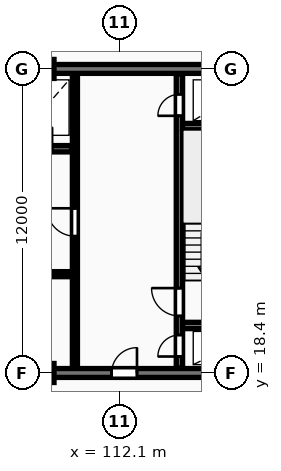
"""IFC4 building model, lengths in metres.
Left out: names, types, materials, properties, quantities, classifications, styles, units other than length and angle.
Written with IfcOpenShell. Run it as: python <this file> out.ifc"""

import sys

from ifc_helpers import new_model, si_unit, direction, frame, frame_2d, origin, origin_2d, place, context, subcontext, project, spatial, rectangle, extrude, element, fill, save


model = new_model("IFC4")
c1 = context("Model", 3, precision=1e-05, world=origin(), true_north=direction((0.0, 1.0)))
c2 = subcontext(c1, "Body", "Model", "MODEL_VIEW")
j1 = project(units=[si_unit("LENGTHUNIT", "METRE"), si_unit("PLANEANGLEUNIT", "RADIAN")], contexts=[c1])
p1 = place(None, origin())
s1 = spatial("IfcSite", under=j1, at=p1, CompositionType="ELEMENT")
p2 = place(p1, origin())
s2 = spatial("IfcBuilding", under=s1, at=p2, CompositionType="ELEMENT")
p3 = place(p2, frame((0.0, 0.0, 119.8)))
s3 = spatial("IfcBuildingStorey", under=s2, at=p3, CompositionType="ELEMENT", Elevation=119.8)
for number, where, z_axis, x_axis in (
    (1, (109.1, 18.4, 0.0), (0.0, 0.0, 1.0), (1.0, 0.0, 0.0)),
    (2, (109.1, 30.4, 0.0), (0.0, 0.0, 1.0), (1.0, 0.0, 0.0)),
):
    element("IfcColumn", number, at=place(p3, frame(where, z_axis=z_axis, x_axis=x_axis)), inside=s3, PredefinedType="COLUMN", context=c2, shape_type="SweptSolid", body=[
        extrude(rectangle(XDim=0.85, YDim=0.75, at=origin_2d()), origin(), (0.0, 0.0, 1.0), 3.25),
    ])
p4 = place(p3, frame((81.925, 30.4, 0.0), z_axis=(0.0, 0.0, 1.0), x_axis=(1.0, 0.0, 0.0)))
e3 = element("IfcWall", 3, at=p4, inside=s3, PredefinedType="SHEAR", context=c2, shape_type="SweptSolid", body=[
    extrude(rectangle(XDim=36.265, YDim=0.35, at=frame_2d((18.132, 0.0))), origin(), (0.0, 0.0, 1.0), 3.25),
])
p5 = place(p3, frame((81.925, 18.4, 0.0), z_axis=(0.0, 0.0, 1.0), x_axis=(1.0, 0.0, 0.0)))
e4 = element("IfcWall", 4, at=p5, inside=s3, PredefinedType="SHEAR", context=c2, shape_type="SweptSolid", body=[
    extrude(rectangle(XDim=36.265, YDim=0.35, at=frame_2d((18.132, 0.0))), origin(), (0.0, 0.0, 1.0), 3.25),
])
p6 = place(p5, frame((5.675, 0.0, 0.0)))
e5 = element("IfcOpeningElement", 5, at=p6, cuts=e4, PredefinedType="OPENING", context=c2, shape_type="SweptSolid", body=[
    extrude(rectangle(XDim=1.0, YDim=2.15, at=frame_2d((0.5, 1.075))), frame((0.0, 0.185, 0.0), z_axis=(0.0, -1.0, 0.0), x_axis=(1.0, 0.0, 0.0)), (0.0, 0.0, 1.0), 0.37),
])
p7 = place(p5, frame((21.925, 0.0, 0.0)))
e6 = element("IfcOpeningElement", 6, at=p7, cuts=e4, PredefinedType="OPENING", context=c2, shape_type="SweptSolid", body=[
    extrude(rectangle(XDim=1.5, YDim=2.2, at=frame_2d((0.75, 1.1))), frame((0.0, 0.185, 0.0), z_axis=(0.0, -1.0, 0.0), x_axis=(1.0, 0.0, 0.0)), (0.0, 0.0, 1.0), 0.37),
])
p8 = place(p5, frame((29.875, 0.0, 0.0)))
e7 = element("IfcOpeningElement", 7, at=p8, cuts=e4, PredefinedType="OPENING", context=c2, shape_type="SweptSolid", body=[
    extrude(rectangle(XDim=1.0, YDim=2.15, at=frame_2d((0.5, 1.075))), frame((0.0, 0.185, 0.0), z_axis=(0.0, -1.0, 0.0), x_axis=(1.0, 0.0, 0.0)), (0.0, 0.0, 1.0), 0.37),
])
p9 = place(p3, frame((99.68, 27.25, 0.0), z_axis=(0.0, 0.0, 1.0), x_axis=(1.0, 0.0, 0.0)))
e8 = element("IfcWall", 8, at=p9, inside=s3, PredefinedType="SHEAR", context=c2, shape_type="SweptSolid", body=[
    extrude(rectangle(XDim=10.54, YDim=0.25, at=frame_2d((5.27, 0.0))), origin(), (0.0, 0.0, 1.0), 3.25),
])
p10 = place(p9, frame((0.76, 0.0, 0.0)))
e9 = element("IfcOpeningElement", 9, at=p10, cuts=e8, PredefinedType="OPENING", context=c2, shape_type="SweptSolid", body=[
    extrude(rectangle(XDim=1.12, YDim=2.12, at=frame_2d((0.56, 1.06))), frame((0.0, 0.135, 0.0), z_axis=(0.0, -1.0, 0.0), x_axis=(1.0, 0.0, 0.0)), (0.0, 0.0, 1.0), 0.27),
])
p11 = place(p9, frame((3.56, 0.0, 0.0)))
e10 = element("IfcOpeningElement", 10, at=p11, cuts=e8, PredefinedType="OPENING", context=c2, shape_type="SweptSolid", body=[
    extrude(rectangle(XDim=1.12, YDim=2.12, at=frame_2d((0.56, 1.06))), frame((0.0, 0.135, 0.0), z_axis=(0.0, -1.0, 0.0), x_axis=(1.0, 0.0, 0.0)), (0.0, 0.0, 1.0), 0.27),
])
p12 = place(p9, frame((6.36, 0.0, 0.0)))
e11 = element("IfcOpeningElement", 11, at=p12, cuts=e8, PredefinedType="OPENING", context=c2, shape_type="SweptSolid", body=[
    extrude(rectangle(XDim=1.12, YDim=2.12, at=frame_2d((0.56, 1.06))), frame((0.0, 0.135, 0.0), z_axis=(0.0, -1.0, 0.0), x_axis=(1.0, 0.0, 0.0)), (0.0, 0.0, 1.0), 0.27),
])
p13 = place(p9, frame((8.92, 0.0, 0.0)))
e12 = element("IfcOpeningElement", 12, at=p13, cuts=e8, PredefinedType="OPENING", context=c2, shape_type="SweptSolid", body=[
    extrude(rectangle(XDim=0.85, YDim=2.05, at=frame_2d((0.425, 1.025))), frame((0.0, 0.135, 0.0), z_axis=(0.0, -1.0, 0.0), x_axis=(1.0, 0.0, 0.0)), (0.0, 0.0, 1.0), 0.27),
])
p14 = place(p3, frame((91.08, 22.3, 0.0), z_axis=(0.0, 0.0, 1.0), x_axis=(1.0, 0.0, 0.0)))
e13 = element("IfcWall", 13, at=p14, inside=s3, PredefinedType="PARTITIONING", context=c2, shape_type="SweptSolid", body=[
    extrude(rectangle(XDim=19.14, YDim=0.2, at=frame_2d((9.57, 0.0))), origin(), (0.0, 0.0, 1.0), 2.97),
])
p15 = place(p14, frame((1.15, 0.0, 0.0)))
e14 = element("IfcOpeningElement", 14, at=p15, cuts=e13, PredefinedType="OPENING", context=c2, shape_type="SweptSolid", body=[
    extrude(rectangle(XDim=0.85, YDim=2.05, at=frame_2d((0.425, 1.025))), frame((0.0, 0.11, 0.0), z_axis=(0.0, -1.0, 0.0), x_axis=(1.0, 0.0, 0.0)), (0.0, 0.0, 1.0), 0.22),
])
p16 = place(p14, frame((3.2, 0.0, 0.0)))
e15 = element("IfcOpeningElement", 15, at=p16, cuts=e13, PredefinedType="OPENING", context=c2, shape_type="SweptSolid", body=[
    extrude(rectangle(XDim=0.85, YDim=2.05, at=frame_2d((0.425, 1.025))), frame((0.0, 0.11, 0.0), z_axis=(0.0, -1.0, 0.0), x_axis=(1.0, 0.0, 0.0)), (0.0, 0.0, 1.0), 0.22),
])
p17 = place(p14, frame((12.72, 0.0, 0.0)))
e16 = element("IfcOpeningElement", 16, at=p17, cuts=e13, PredefinedType="OPENING", context=c2, shape_type="SweptSolid", body=[
    extrude(rectangle(XDim=1.5, YDim=2.2, at=frame_2d((0.75, 1.1))), frame((0.0, 0.11, 0.0), z_axis=(0.0, -1.0, 0.0), x_axis=(1.0, 0.0, 0.0)), (0.0, 0.0, 1.0), 0.22),
])
p18 = place(p14, frame((6.42, 0.0, 0.0)))
e17 = element("IfcOpeningElement", 17, at=p18, cuts=e13, PredefinedType="OPENING", context=c2, shape_type="SweptSolid", body=[
    extrude(rectangle(XDim=0.92, YDim=2.08, at=frame_2d((0.46, 1.04))), frame((0.0, 0.11, 0.0), z_axis=(0.0, -1.0, 0.0), x_axis=(1.0, 0.0, 0.0)), (0.0, 0.0, 1.0), 0.22),
])
p19 = place(p14, frame((15.92, 0.0, 0.0)))
e18 = element("IfcOpeningElement", 18, at=p19, cuts=e13, PredefinedType="OPENING", context=c2, shape_type="SweptSolid", body=[
    extrude(rectangle(XDim=0.88, YDim=2.06, at=frame_2d((0.44, 1.03))), frame((0.0, 0.11, 0.0), z_axis=(0.0, -1.0, 0.0), x_axis=(1.0, 0.0, 0.0)), (0.0, 0.0, 1.0), 0.22),
])
p20 = place(p3, frame((110.35, 18.6, 0.0), z_axis=(0.0, 0.0, 1.0), x_axis=(0.0, 1.0, 0.0)))
e19 = element("IfcWall", 19, at=p20, inside=s3, PredefinedType="PARTITIONING", context=c2, shape_type="SweptSolid", body=[
    extrude(rectangle(XDim=11.6, YDim=0.2, at=frame_2d((5.8, 0.0))), origin(), (0.0, 0.0, 1.0), 2.97),
])
p21 = place(p20, frame((5.2, 0.0, 0.0)))
e20 = element("IfcOpeningElement", 20, at=p21, cuts=e19, PredefinedType="OPENING", context=c2, shape_type="SweptSolid", body=[
    extrude(rectangle(XDim=1.1, YDim=2.15, at=frame_2d((0.55, 1.075))), frame((0.0, 0.11, 0.0), z_axis=(0.0, -1.0, 0.0), x_axis=(1.0, 0.0, 0.0)), (0.0, 0.0, 1.0), 0.22),
])
p22 = place(p3, frame((114.475, 18.6, 0.0), z_axis=(0.0, 0.0, 1.0), x_axis=(0.0, 1.0, 0.0)))
e21 = element("IfcWall", 21, at=p22, inside=s3, PredefinedType="SHEAR", context=c2, shape_type="SweptSolid", body=[
    extrude(rectangle(XDim=11.6, YDim=0.25, at=frame_2d((5.8, 0.0))), origin(), (0.0, 0.0, 1.0), 3.25),
])
p23 = place(p22, frame((0.45, 0.0, 0.0)))
e22 = element("IfcOpeningElement", 22, at=p23, cuts=e21, PredefinedType="OPENING", context=c2, shape_type="SweptSolid", body=[
    extrude(rectangle(XDim=0.85, YDim=2.05, at=frame_2d((0.425, 1.025))), frame((0.0, 0.135, 0.0), z_axis=(0.0, -1.0, 0.0), x_axis=(1.0, 0.0, 0.0)), (0.0, 0.0, 1.0), 0.27),
])
p24 = place(p22, frame((2.05, 0.0, 0.0)))
e23 = element("IfcOpeningElement", 23, at=p24, cuts=e21, PredefinedType="OPENING", context=c2, shape_type="SweptSolid", body=[
    extrude(rectangle(XDim=1.1, YDim=2.1, at=frame_2d((0.55, 1.05))), frame((0.0, 0.135, 0.0), z_axis=(0.0, -1.0, 0.0), x_axis=(1.0, 0.0, 0.0)), (0.0, 0.0, 1.0), 0.27),
])
p25 = place(p22, frame((9.95, 0.0, 0.0)))
e24 = element("IfcOpeningElement", 24, at=p25, cuts=e21, PredefinedType="OPENING", context=c2, shape_type="SweptSolid", body=[
    extrude(rectangle(XDim=0.85, YDim=2.05, at=frame_2d((0.425, 1.025))), frame((0.0, 0.135, 0.0), z_axis=(0.0, -1.0, 0.0), x_axis=(1.0, 0.0, 0.0)), (0.0, 0.0, 1.0), 0.27),
])
for number, where, z_axis, x_axis in (
    (25, (114.6, 20.275, 0.0), (0.0, 0.0, 1.0), (1.0, 0.0, 0.0)),
    (26, (114.6, 28.125, 0.0), (0.0, 0.0, 1.0), (1.0, 0.0, 0.0)),
):
    element("IfcWall", number, at=place(p3, frame(where, z_axis=z_axis, x_axis=x_axis)), inside=s3, PredefinedType="SHEAR", context=c2, shape_type="SweptSolid", body=[
        extrude(rectangle(XDim=3.24, YDim=0.25, at=frame_2d((1.62, 0.0))), origin(), (0.0, 0.0, 1.0), 3.25),
    ])
p26 = place(p8, origin())
e27 = element("IfcDoor", 27, at=p26, inside=s3, OperationType="SINGLE_SWING_RIGHT", PredefinedType="DOOR", context=c2, shape_type="SweptSolid", body=[
    extrude(rectangle(XDim=1.0, YDim=2.15, at=frame_2d((0.5, 1.075))), frame((0.0, 0.025, 0.0), z_axis=(0.0, -1.0, 0.0), x_axis=(1.0, 0.0, 0.0)), (0.0, 0.0, 1.0), 0.05),
])
fill(e7, e27)
p27 = place(p21, origin())
e28 = element("IfcDoor", 28, at=p27, inside=s3, OperationType="SINGLE_SWING_RIGHT", PredefinedType="DOOR", context=c2, shape_type="SweptSolid", body=[
    extrude(rectangle(XDim=1.1, YDim=2.15, at=frame_2d((0.55, 1.075))), frame((0.0, 0.025, 0.0), z_axis=(0.0, -1.0, 0.0), x_axis=(1.0, 0.0, 0.0)), (0.0, 0.0, 1.0), 0.05),
])
fill(e20, e28)
p28 = place(p23, origin())
e29 = element("IfcDoor", 29, at=p28, inside=s3, OperationType="SINGLE_SWING_LEFT", PredefinedType="DOOR", context=c2, shape_type="SweptSolid", body=[
    extrude(rectangle(XDim=0.85, YDim=2.05, at=frame_2d((0.425, 1.025))), frame((0.0, 0.025, 0.0), z_axis=(0.0, -1.0, 0.0), x_axis=(1.0, 0.0, 0.0)), (0.0, 0.0, 1.0), 0.05),
])
fill(e22, e29)
p29 = place(p24, origin())
e30 = element("IfcDoor", 30, at=p29, inside=s3, OperationType="SINGLE_SWING_RIGHT", PredefinedType="DOOR", context=c2, shape_type="SweptSolid", body=[
    extrude(rectangle(XDim=1.1, YDim=2.1, at=frame_2d((0.55, 1.05))), frame((0.0, 0.025, 0.0), z_axis=(0.0, -1.0, 0.0), x_axis=(1.0, 0.0, 0.0)), (0.0, 0.0, 1.0), 0.05),
])
fill(e23, e30)
p30 = place(p25, origin())
e31 = element("IfcDoor", 31, at=p30, inside=s3, OperationType="SINGLE_SWING_LEFT", PredefinedType="DOOR", context=c2, shape_type="SweptSolid", body=[
    extrude(rectangle(XDim=0.85, YDim=2.05, at=frame_2d((0.425, 1.025))), frame((0.0, 0.025, 0.0), z_axis=(0.0, -1.0, 0.0), x_axis=(1.0, 0.0, 0.0)), (0.0, 0.0, 1.0), 0.05),
])
fill(e24, e31)
save(model, sys.argv[1])
